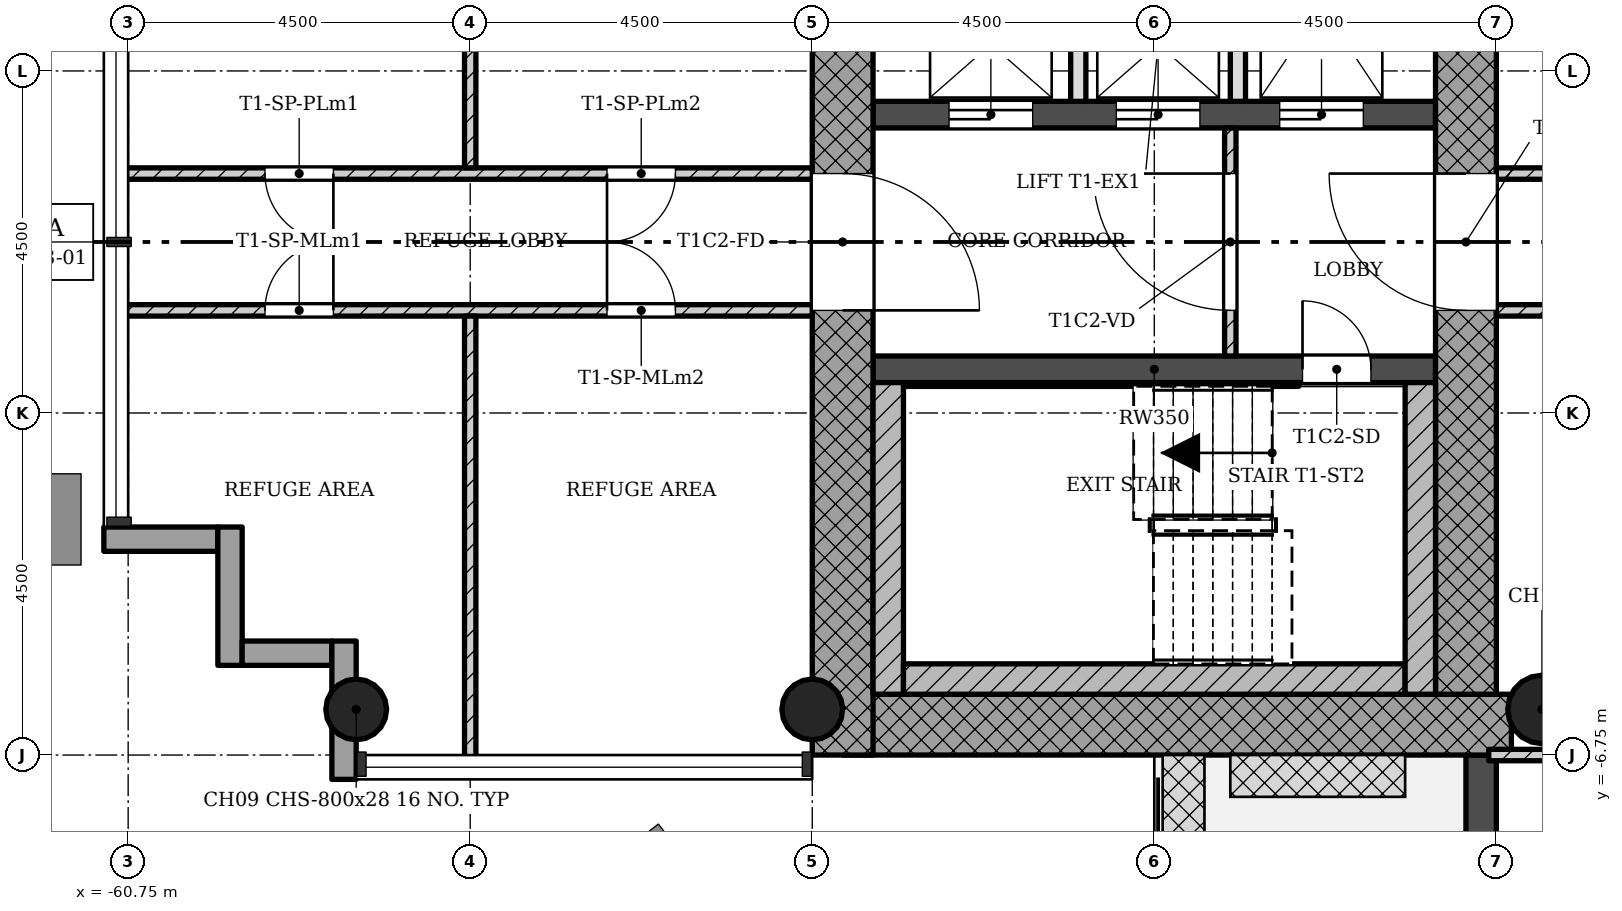
"""IFC4 building model, lengths in metres.
Left out: names, types, materials, properties, quantities, classifications, styles, units other than length and angle.
Written with IfcOpenShell. Run it as: python <this file> out.ifc"""

import sys

from ifc_helpers import new_model, si_unit, direction, frame, frame_2d, origin, origin_2d, place, context, subcontext, project, spatial, rectangle, hollow_circle, extrude, element, fill, save


model = new_model("IFC4")
c1 = context("Model", 3, precision=1e-05, world=origin(), true_north=direction((0.0, 1.0)))
c2 = subcontext(c1, "Body", "Model", "MODEL_VIEW")
j1 = project(units=[si_unit("LENGTHUNIT", "METRE"), si_unit("PLANEANGLEUNIT", "RADIAN")], contexts=[c1])
p1 = place(None, origin())
s1 = spatial("IfcSite", under=j1, at=p1, CompositionType="ELEMENT")
p2 = place(p1, origin())
s2 = spatial("IfcBuilding", under=s1, at=p2, CompositionType="ELEMENT")
p3 = place(p2, frame((0.0, 0.0, 128.7)))
s3 = spatial("IfcBuildingStorey", under=s2, at=p3, CompositionType="ELEMENT", Elevation=128.7)
p4 = place(p3, frame((-51.348, -6.35, 0.0), z_axis=(0.0, 0.0, 1.0), x_axis=(1.0, 0.0, 0.0)))
e1 = element("IfcWall", 1, at=p4, inside=s3, PredefinedType="SHEAR", context=c2, shape_type="SweptSolid", body=[
    extrude(rectangle(XDim=8.796, YDim=0.8, at=frame_2d((4.398, 0.0))), origin(), (0.0, 0.0, 1.0), 5.0),
])
p5 = place(p3, frame((-43.15, -5.95, 0.0), z_axis=(0.0, 0.0, 1.0), x_axis=(0.0, 1.0, 0.0)))
e2 = element("IfcWall", 2, at=p5, inside=s3, PredefinedType="SHEAR", context=c2, shape_type="SweptSolid", body=[
    extrude(rectangle(XDim=12.7, YDim=0.8, at=frame_2d((6.35, 0.0))), origin(), (0.0, 0.0, 1.0), 5.0),
])
p6 = place(p5, frame((5.05, 0.0, 0.0)))
e3 = element("IfcOpeningElement", 3, at=p6, cuts=e2, PredefinedType="OPENING", context=c2, shape_type="SweptSolid", body=[
    extrude(rectangle(XDim=1.8, YDim=2.1, at=frame_2d((0.9, 1.05))), frame((0.0, 0.41, 0.0), z_axis=(0.0, -1.0, 0.0), x_axis=(1.0, 0.0, 0.0)), (0.0, 0.0, 1.0), 0.82),
])
p7 = place(p3, frame((-51.35, 5.95, 0.0), z_axis=(0.0, 0.0, 1.0), x_axis=(0.0, -1.0, 0.0)))
e4 = element("IfcWall", 4, at=p7, inside=s3, PredefinedType="SHEAR", context=c2, shape_type="SweptSolid", body=[
    extrude(rectangle(XDim=12.7, YDim=0.8, at=frame_2d((6.35, 0.0))), origin(), (0.0, 0.0, 1.0), 5.0),
])
p8 = place(p7, frame((5.05, 0.0, 0.0)))
e5 = element("IfcOpeningElement", 5, at=p8, cuts=e4, PredefinedType="OPENING", context=c2, shape_type="SweptSolid", body=[
    extrude(rectangle(XDim=1.8, YDim=2.1, at=frame_2d((0.9, 1.05))), frame((0.0, 0.41, 0.0), z_axis=(0.0, -1.0, 0.0), x_axis=(1.0, 0.0, 0.0)), (0.0, 0.0, 1.0), 0.82),
])
p9 = place(p3, frame((-50.95, -1.675, 0.0), z_axis=(0.0, 0.0, 1.0), x_axis=(1.0, 0.0, 0.0)))
e6 = element("IfcWall", 6, at=p9, inside=s3, PredefinedType="SHEAR", context=c2, shape_type="SweptSolid", body=[
    extrude(rectangle(XDim=7.4, YDim=0.35, at=frame_2d((3.7, 0.0))), origin(), (0.0, 0.0, 1.0), 5.0),
])
p10 = place(p9, frame((5.65, 0.0, 0.0)))
e7 = element("IfcOpeningElement", 7, at=p10, cuts=e6, PredefinedType="OPENING", context=c2, shape_type="SweptSolid", body=[
    extrude(rectangle(XDim=0.9, YDim=2.1, at=frame_2d((0.45, 1.05))), frame((0.0, 0.185, 0.0), z_axis=(0.0, -1.0, 0.0), x_axis=(1.0, 0.0, 0.0)), (0.0, 0.0, 1.0), 0.37),
])
p11 = place(p3, frame((-50.95, 1.675, 0.0), z_axis=(0.0, 0.0, 1.0), x_axis=(1.0, 0.0, 0.0)))
e8 = element("IfcWall", 8, at=p11, inside=s3, PredefinedType="SHEAR", context=c2, shape_type="SweptSolid", body=[
    extrude(rectangle(XDim=7.4, YDim=0.35, at=frame_2d((3.7, 0.0))), origin(), (0.0, 0.0, 1.0), 5.0),
])
p12 = place(p11, frame((5.35, 0.0, 0.0)))
e9 = element("IfcOpeningElement", 9, at=p12, cuts=e8, PredefinedType="OPENING", context=c2, shape_type="SweptSolid", body=[
    extrude(rectangle(XDim=1.1, YDim=2.1, at=frame_2d((0.55, 1.05))), frame((0.0, 0.185, 0.0), z_axis=(0.0, -1.0, 0.0), x_axis=(1.0, 0.0, 0.0)), (0.0, 0.0, 1.0), 0.37),
])
p13 = place(p11, frame((3.2, 0.0, 0.0)))
e10 = element("IfcOpeningElement", 10, at=p13, cuts=e8, PredefinedType="OPENING", context=c2, shape_type="SweptSolid", body=[
    extrude(rectangle(XDim=1.1, YDim=2.1, at=frame_2d((0.55, 1.05))), frame((0.0, 0.185, 0.0), z_axis=(0.0, -1.0, 0.0), x_axis=(1.0, 0.0, 0.0)), (0.0, 0.0, 1.0), 0.37),
])
p14 = place(p11, frame((1.0, 0.0, 0.0)))
e11 = element("IfcOpeningElement", 11, at=p14, cuts=e8, PredefinedType="OPENING", context=c2, shape_type="SweptSolid", body=[
    extrude(rectangle(XDim=1.1, YDim=2.1, at=frame_2d((0.55, 1.05))), frame((0.0, 0.185, 0.0), z_axis=(0.0, -1.0, 0.0), x_axis=(1.0, 0.0, 0.0)), (0.0, 0.0, 1.0), 0.37),
])
for number, where, z_axis, x_axis in (
    (12, (-51.75, -6.15, 0.0), (0.0, 0.0, 1.0), (1.0, 0.0, 0.0)),
    (13, (-57.75, -6.15, 0.0), (0.0, 0.0, 1.0), (1.0, 0.0, 0.0)),
):
    element("IfcColumn", number, at=place(p3, frame(where, z_axis=z_axis, x_axis=x_axis)), inside=s3, PredefinedType="COLUMN", context=c2, shape_type="SweptSolid", body=[
        extrude(hollow_circle(Radius=0.4, WallThickness=0.028, at=origin_2d()), origin(), (0.0, 0.0, 1.0), 5.0),
    ])
p15 = place(p3, frame((-42.15, -6.15, 0.0), z_axis=(0.0, 0.0, 1.0), x_axis=(1.0, 0.0, 0.0)))
e14 = element("IfcColumn", 14, at=p15, inside=s3, PredefinedType="COLUMN", context=c2, shape_type="SweptSolid", body=[
    extrude(hollow_circle(Radius=0.45, WallThickness=0.032, at=origin_2d()), origin(), (0.0, 0.0, 1.0), 5.0),
])
p16 = place(p3, frame((-61.07, -3.91, -0.3), z_axis=(0.0, 0.0, 1.0), x_axis=(1.0, 0.0, 0.0)))
e15 = element("IfcWall", 15, at=p16, inside=s3, PredefinedType="STANDARD", context=c2, shape_type="SweptSolid", body=[
    extrude(rectangle(XDim=1.5, YDim=0.32, at=frame_2d((0.75, 0.0))), origin(), (0.0, 0.0, 1.0), 5.0),
])
p17 = place(p3, frame((-59.41, -3.75, -0.3), z_axis=(0.0, 0.0, 1.0), x_axis=(0.0, -1.0, 0.0)))
e16 = element("IfcWall", 16, at=p17, inside=s3, PredefinedType="STANDARD", context=c2, shape_type="SweptSolid", body=[
    extrude(rectangle(XDim=1.82, YDim=0.32, at=frame_2d((0.91, 0.0))), origin(), (0.0, 0.0, 1.0), 5.0),
])
p18 = place(p3, frame((-59.25, -5.41, -0.3), z_axis=(0.0, 0.0, 1.0), x_axis=(1.0, 0.0, 0.0)))
e17 = element("IfcWall", 17, at=p18, inside=s3, PredefinedType="STANDARD", context=c2, shape_type="SweptSolid", body=[
    extrude(rectangle(XDim=1.18, YDim=0.32, at=frame_2d((0.59, 0.0))), origin(), (0.0, 0.0, 1.0), 5.0),
])
p19 = place(p3, frame((-57.91, -5.25, -0.3), z_axis=(0.0, 0.0, 1.0), x_axis=(0.0, -1.0, 0.0)))
e18 = element("IfcWall", 18, at=p19, inside=s3, PredefinedType="STANDARD", context=c2, shape_type="SweptSolid", body=[
    extrude(rectangle(XDim=1.82, YDim=0.32, at=frame_2d((0.91, 0.0))), origin(), (0.0, 0.0, 1.0), 5.0),
])
p20 = place(p3, frame((-42.95, -6.75, -0.02), z_axis=(0.0, 0.0, 1.0), x_axis=(0.0, -1.0, 0.0)))
e19 = element("IfcWall", 19, at=p20, inside=s3, PredefinedType="STANDARD", context=c2, shape_type="SweptSolid", body=[
    extrude(rectangle(XDim=4.5, YDim=0.4, at=frame_2d((2.25, 0.0))), origin(), (0.0, 0.0, 1.0), 4.72),
])
p21 = place(p20, frame((1.35, 0.0, 0.02)))
e20 = element("IfcOpeningElement", 20, at=p21, cuts=e19, PredefinedType="OPENING", context=c2, shape_type="SweptSolid", body=[
    extrude(rectangle(XDim=1.8, YDim=2.1, at=frame_2d((0.9, 1.05))), frame((0.0, 0.21, 0.0), z_axis=(0.0, -1.0, 0.0), x_axis=(1.0, 0.0, 0.0)), (0.0, 0.0, 1.0), 0.42),
])
p22 = place(p3, frame((-46.25, 1.5, 0.0), z_axis=(0.0, 0.0, 1.0), x_axis=(0.0, -1.0, 0.0)))
e21 = element("IfcWall", 21, at=p22, inside=s3, PredefinedType="PARTITIONING", context=c2, shape_type="SweptSolid", body=[
    extrude(rectangle(XDim=3.0, YDim=0.15, at=frame_2d((1.5, 0.0))), origin(), (0.0, 0.0, 1.0), 4.58),
])
p23 = place(p22, frame((0.6, 0.0, 0.0)))
e22 = element("IfcOpeningElement", 22, at=p23, cuts=e21, PredefinedType="OPENING", context=c2, shape_type="SweptSolid", body=[
    extrude(rectangle(XDim=1.8, YDim=2.1, at=frame_2d((0.9, 1.05))), frame((0.0, 0.085, 0.0), z_axis=(0.0, -1.0, 0.0), x_axis=(1.0, 0.0, 0.0)), (0.0, 0.0, 1.0), 0.17),
])
for number, where, z_axis, x_axis in (
    (23, (-46.15, 5.95, 0.0), (0.0, 0.0, 1.0), (0.0, -1.0, 0.0)),
    (24, (-48.25, 5.95, 0.0), (0.0, 0.0, 1.0), (0.0, -1.0, 0.0)),
):
    element("IfcWall", number, at=place(p3, frame(where, z_axis=z_axis, x_axis=x_axis)), inside=s3, PredefinedType="SOLIDWALL", context=c2, shape_type="SweptSolid", body=[
        extrude(rectangle(XDim=4.1, YDim=0.2, at=frame_2d((2.05, 0.0))), origin(), (0.0, 0.0, 1.0), 4.58),
    ])
p24 = place(p3, frame((-42.75, 0.9, 0.0), z_axis=(0.0, 0.0, 1.0), x_axis=(1.0, 0.0, 0.0)))
e25 = element("IfcWall", 25, at=p24, inside=s3, PredefinedType="PARTITIONING", context=c2, shape_type="SweptSolid", body=[
    extrude(rectangle(XDim=5.85, YDim=0.15, at=frame_2d((2.925, 0.0))), origin(), (0.0, 0.0, 1.0), 4.58),
])
p25 = place(p24, frame((2.475, 0.0, 0.0)))
e26 = element("IfcOpeningElement", 26, at=p25, cuts=e25, PredefinedType="OPENING", context=c2, shape_type="SweptSolid", body=[
    extrude(rectangle(XDim=0.9, YDim=2.1, at=frame_2d((0.45, 1.05))), frame((0.0, 0.085, 0.0), z_axis=(0.0, -1.0, 0.0), x_axis=(1.0, 0.0, 0.0)), (0.0, 0.0, 1.0), 0.17),
])
p26 = place(p3, frame((-42.75, -0.9, 0.0), z_axis=(0.0, 0.0, 1.0), x_axis=(1.0, 0.0, 0.0)))
e27 = element("IfcWall", 27, at=p26, inside=s3, PredefinedType="PARTITIONING", context=c2, shape_type="SweptSolid", body=[
    extrude(rectangle(XDim=5.85, YDim=0.15, at=frame_2d((2.925, 0.0))), origin(), (0.0, 0.0, 1.0), 4.58),
])
p27 = place(p26, frame((2.475, 0.0, 0.0)))
e28 = element("IfcOpeningElement", 28, at=p27, cuts=e27, PredefinedType="OPENING", context=c2, shape_type="SweptSolid", body=[
    extrude(rectangle(XDim=0.9, YDim=2.1, at=frame_2d((0.45, 1.05))), frame((0.0, 0.085, 0.0), z_axis=(0.0, -1.0, 0.0), x_axis=(1.0, 0.0, 0.0)), (0.0, 0.0, 1.0), 0.17),
])
p28 = place(p3, frame((-60.85, 0.9, 0.0), z_axis=(0.0, 0.0, 1.0), x_axis=(1.0, 0.0, 0.0)))
e29 = element("IfcWall", 29, at=p28, inside=s3, PredefinedType="PARTITIONING", context=c2, shape_type="SweptSolid", body=[
    extrude(rectangle(XDim=9.1, YDim=0.15, at=frame_2d((4.55, 0.0))), origin(), (0.0, 0.0, 1.0), 4.58),
])
p29 = place(p28, frame((1.9, 0.0, 0.0)))
e30 = element("IfcOpeningElement", 30, at=p29, cuts=e29, PredefinedType="OPENING", context=c2, shape_type="SweptSolid", body=[
    extrude(rectangle(XDim=0.9, YDim=2.1, at=frame_2d((0.45, 1.05))), frame((0.0, 0.085, 0.0), z_axis=(0.0, -1.0, 0.0), x_axis=(1.0, 0.0, 0.0)), (0.0, 0.0, 1.0), 0.17),
])
p30 = place(p28, frame((6.4, 0.0, 0.0)))
e31 = element("IfcOpeningElement", 31, at=p30, cuts=e29, PredefinedType="OPENING", context=c2, shape_type="SweptSolid", body=[
    extrude(rectangle(XDim=0.9, YDim=2.1, at=frame_2d((0.45, 1.05))), frame((0.0, 0.085, 0.0), z_axis=(0.0, -1.0, 0.0), x_axis=(1.0, 0.0, 0.0)), (0.0, 0.0, 1.0), 0.17),
])
p31 = place(p3, frame((-56.25, 0.975, 0.0), z_axis=(0.0, 0.0, 1.0), x_axis=(0.0, 1.0, 0.0)))
e32 = element("IfcWall", 32, at=p31, inside=s3, PredefinedType="PARTITIONING", context=c2, shape_type="SweptSolid", body=[
    extrude(rectangle(XDim=5.875, YDim=0.15, at=frame_2d((2.938, 0.0))), origin(), (0.0, 0.0, 1.0), 4.58),
])
p32 = place(p3, frame((-60.85, -0.9, 0.0), z_axis=(0.0, 0.0, 1.0), x_axis=(1.0, 0.0, 0.0)))
e33 = element("IfcWall", 33, at=p32, inside=s3, PredefinedType="PARTITIONING", context=c2, shape_type="SweptSolid", body=[
    extrude(rectangle(XDim=9.1, YDim=0.15, at=frame_2d((4.55, 0.0))), origin(), (0.0, 0.0, 1.0), 4.58),
])
p33 = place(p32, frame((1.9, 0.0, 0.0)))
e34 = element("IfcOpeningElement", 34, at=p33, cuts=e33, PredefinedType="OPENING", context=c2, shape_type="SweptSolid", body=[
    extrude(rectangle(XDim=0.9, YDim=2.1, at=frame_2d((0.45, 1.05))), frame((0.0, 0.085, 0.0), z_axis=(0.0, -1.0, 0.0), x_axis=(1.0, 0.0, 0.0)), (0.0, 0.0, 1.0), 0.17),
])
p34 = place(p32, frame((6.4, 0.0, 0.0)))
e35 = element("IfcOpeningElement", 35, at=p34, cuts=e33, PredefinedType="OPENING", context=c2, shape_type="SweptSolid", body=[
    extrude(rectangle(XDim=0.9, YDim=2.1, at=frame_2d((0.45, 1.05))), frame((0.0, 0.085, 0.0), z_axis=(0.0, -1.0, 0.0), x_axis=(1.0, 0.0, 0.0)), (0.0, 0.0, 1.0), 0.17),
])
p35 = place(p3, frame((-56.25, -0.975, 0.0), z_axis=(0.0, 0.0, 1.0), x_axis=(0.0, -1.0, 0.0)))
e36 = element("IfcWall", 36, at=p35, inside=s3, PredefinedType="PARTITIONING", context=c2, shape_type="SweptSolid", body=[
    extrude(rectangle(XDim=5.875, YDim=0.15, at=frame_2d((2.938, 0.0))), origin(), (0.0, 0.0, 1.0), 4.58),
])
p36 = place(p3, frame((-42.85, -6.75, 0.0), z_axis=(0.0, 0.0, 1.0), x_axis=(1.0, 0.0, 0.0)))
e37 = element("IfcWall", 37, at=p36, inside=s3, PredefinedType="PARTITIONING", context=c2, shape_type="SweptSolid", body=[
    extrude(rectangle(XDim=13.7, YDim=0.15, at=frame_2d((6.85, 0.0))), origin(), (0.0, 0.0, 1.0), 4.58),
])
p37 = place(p36, frame((5.95, 0.0, 0.0)))
e38 = element("IfcOpeningElement", 38, at=p37, cuts=e37, PredefinedType="OPENING", context=c2, shape_type="SweptSolid", body=[
    extrude(rectangle(XDim=1.8, YDim=2.1, at=frame_2d((0.9, 1.05))), frame((0.0, 0.085, 0.0), z_axis=(0.0, -1.0, 0.0), x_axis=(1.0, 0.0, 0.0)), (0.0, 0.0, 1.0), 0.17),
])
p38 = place(p3, frame((-50.75, -1.85, 0.0), z_axis=(0.0, 0.0, 1.0), x_axis=(0.0, -1.0, 0.0)))
e39 = element("IfcWall", 39, at=p38, inside=s3, PredefinedType="SHEAR", context=c2, shape_type="SweptSolid", body=[
    extrude(rectangle(XDim=4.1, YDim=0.4, at=frame_2d((2.05, 0.0))), origin(), (0.0, 0.0, 1.0), 5.0),
])
p39 = place(p3, frame((-43.95, -5.75, 0.0), z_axis=(0.0, 0.0, 1.0), x_axis=(-1.0, 0.0, 0.0)))
e40 = element("IfcWall", 40, at=p39, inside=s3, PredefinedType="SHEAR", context=c2, shape_type="SweptSolid", body=[
    extrude(rectangle(XDim=6.6, YDim=0.4, at=frame_2d((3.3, 0.0))), origin(), (0.0, 0.0, 1.0), 5.0),
])
p40 = place(p3, frame((-43.75, -1.85, 0.0), z_axis=(0.0, 0.0, 1.0), x_axis=(0.0, -1.0, 0.0)))
e41 = element("IfcWall", 41, at=p40, inside=s3, PredefinedType="SHEAR", context=c2, shape_type="SweptSolid", body=[
    extrude(rectangle(XDim=4.1, YDim=0.4, at=frame_2d((2.05, 0.0))), origin(), (0.0, 0.0, 1.0), 5.0),
])
p41 = place(p3, frame((-45.35, -1.875, 0.0), z_axis=(0.0, 0.0, 1.0), x_axis=(-1.0, 0.0, 0.0)))
e42 = element("IfcWall", 42, at=p41, inside=s3, PredefinedType="SHEAR", context=c2, shape_type="SweptSolid", body=[
    extrude(rectangle(XDim=5.2, YDim=0.05, at=frame_2d((2.6, 0.0))), origin(), (0.0, 0.0, 1.0), 5.0),
])
p42 = place(p23, origin())
e43 = element("IfcDoor", 43, at=p42, inside=s3, OperationType="SINGLE_SWING_LEFT", PredefinedType="DOOR", context=c2, shape_type="SweptSolid", body=[
    extrude(rectangle(XDim=1.8, YDim=2.1, at=frame_2d((0.9, 1.05))), frame((0.0, 0.025, 0.0), z_axis=(0.0, -1.0, 0.0), x_axis=(1.0, 0.0, 0.0)), (0.0, 0.0, 1.0), 0.05),
])
fill(e22, e43)
p43 = place(p29, origin())
e44 = element("IfcDoor", 44, at=p43, inside=s3, OperationType="SINGLE_SWING_RIGHT", PredefinedType="DOOR", context=c2, shape_type="SweptSolid", body=[
    extrude(rectangle(XDim=0.9, YDim=2.1, at=frame_2d((0.45, 1.05))), frame((0.0, 0.025, 0.0), z_axis=(0.0, -1.0, 0.0), x_axis=(1.0, 0.0, 0.0)), (0.0, 0.0, 1.0), 0.05),
])
fill(e30, e44)
p44 = place(p30, origin())
e45 = element("IfcDoor", 45, at=p44, inside=s3, OperationType="SINGLE_SWING_LEFT", PredefinedType="DOOR", context=c2, shape_type="SweptSolid", body=[
    extrude(rectangle(XDim=0.9, YDim=2.1, at=frame_2d((0.45, 1.05))), frame((0.0, 0.025, 0.0), z_axis=(0.0, -1.0, 0.0), x_axis=(1.0, 0.0, 0.0)), (0.0, 0.0, 1.0), 0.05),
])
fill(e31, e45)
p45 = place(p33, origin())
e46 = element("IfcDoor", 46, at=p45, inside=s3, OperationType="SINGLE_SWING_LEFT", PredefinedType="DOOR", context=c2, shape_type="SweptSolid", body=[
    extrude(rectangle(XDim=0.9, YDim=2.1, at=frame_2d((0.45, 1.05))), frame((0.0, 0.025, 0.0), z_axis=(0.0, -1.0, 0.0), x_axis=(1.0, 0.0, 0.0)), (0.0, 0.0, 1.0), 0.05),
])
fill(e34, e46)
p46 = place(p34, origin())
e47 = element("IfcDoor", 47, at=p46, inside=s3, OperationType="SINGLE_SWING_RIGHT", PredefinedType="DOOR", context=c2, shape_type="SweptSolid", body=[
    extrude(rectangle(XDim=0.9, YDim=2.1, at=frame_2d((0.45, 1.05))), frame((0.0, 0.025, 0.0), z_axis=(0.0, -1.0, 0.0), x_axis=(1.0, 0.0, 0.0)), (0.0, 0.0, 1.0), 0.05),
])
fill(e35, e47)
p47 = place(p10, origin())
e48 = element("IfcDoor", 48, at=p47, inside=s3, OperationType="SINGLE_SWING_RIGHT", PredefinedType="DOOR", context=c2, shape_type="SweptSolid", body=[
    extrude(rectangle(XDim=0.9, YDim=2.1, at=frame_2d((0.45, 1.05))), frame((0.0, 0.025, 0.0), z_axis=(0.0, -1.0, 0.0), x_axis=(1.0, 0.0, 0.0)), (0.0, 0.0, 1.0), 0.05),
])
fill(e7, e48)
p48 = place(p12, origin())
e49 = element("IfcDoor", 49, at=p48, inside=s3, OperationType="SLIDING_TO_LEFT", PredefinedType="DOOR", context=c2, shape_type="SweptSolid", body=[
    extrude(rectangle(XDim=1.1, YDim=2.1, at=frame_2d((0.55, 1.05))), frame((0.0, 0.025, 0.0), z_axis=(0.0, -1.0, 0.0), x_axis=(1.0, 0.0, 0.0)), (0.0, 0.0, 1.0), 0.05),
])
fill(e9, e49)
p49 = place(p13, origin())
e50 = element("IfcDoor", 50, at=p49, inside=s3, OperationType="SLIDING_TO_LEFT", PredefinedType="DOOR", context=c2, shape_type="SweptSolid", body=[
    extrude(rectangle(XDim=1.1, YDim=2.1, at=frame_2d((0.55, 1.05))), frame((0.0, 0.025, 0.0), z_axis=(0.0, -1.0, 0.0), x_axis=(1.0, 0.0, 0.0)), (0.0, 0.0, 1.0), 0.05),
])
fill(e10, e50)
p50 = place(p14, origin())
e51 = element("IfcDoor", 51, at=p50, inside=s3, OperationType="SLIDING_TO_LEFT", PredefinedType="DOOR", context=c2, shape_type="SweptSolid", body=[
    extrude(rectangle(XDim=1.1, YDim=2.1, at=frame_2d((0.55, 1.05))), frame((0.0, 0.025, 0.0), z_axis=(0.0, -1.0, 0.0), x_axis=(1.0, 0.0, 0.0)), (0.0, 0.0, 1.0), 0.05),
])
fill(e11, e51)
p51 = place(p6, origin())
e52 = element("IfcDoor", 52, at=p51, inside=s3, OperationType="SINGLE_SWING_LEFT", PredefinedType="DOOR", context=c2, shape_type="SweptSolid", body=[
    extrude(rectangle(XDim=1.8, YDim=2.1, at=frame_2d((0.9, 1.05))), frame((0.0, 0.025, 0.0), z_axis=(0.0, -1.0, 0.0), x_axis=(1.0, 0.0, 0.0)), (0.0, 0.0, 1.0), 0.05),
])
fill(e3, e52)
p52 = place(p8, origin())
e53 = element("IfcDoor", 53, at=p52, inside=s3, OperationType="SINGLE_SWING_LEFT", PredefinedType="DOOR", context=c2, shape_type="SweptSolid", body=[
    extrude(rectangle(XDim=1.8, YDim=2.1, at=frame_2d((0.9, 1.05))), frame((0.0, 0.025, 0.0), z_axis=(0.0, -1.0, 0.0), x_axis=(1.0, 0.0, 0.0)), (0.0, 0.0, 1.0), 0.05),
])
fill(e5, e53)
save(model, sys.argv[1])
